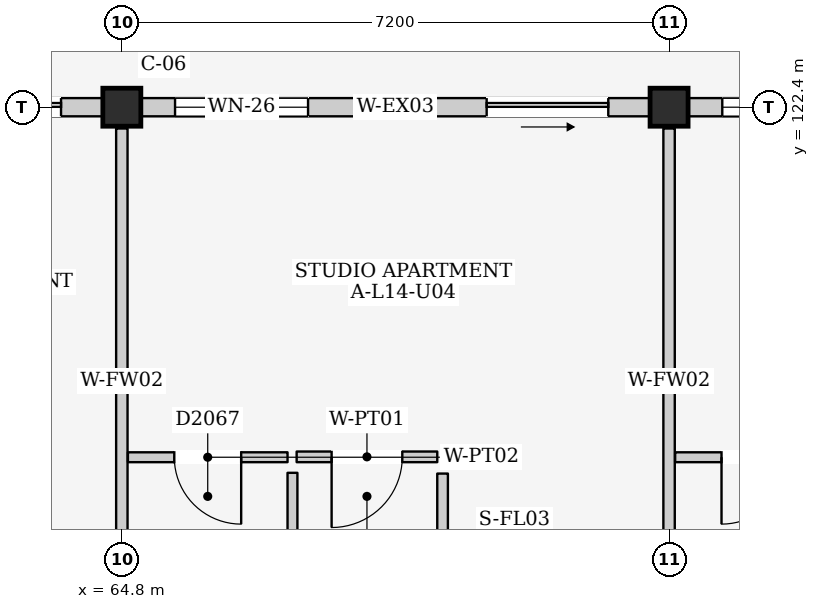
"""IFC4 building model, lengths in metres.
Left out: names, types, materials, properties, quantities, classifications, styles, units other than length and angle.
Written with IfcOpenShell. Run it as: python <this file> out.ifc"""

import sys

from ifc_helpers import new_model, si_unit, direction, frame, frame_2d, origin, origin_2d, place, context, subcontext, project, spatial, rectangle, extrude, element, fill, save


model = new_model("IFC4")
c1 = context("Model", 3, precision=1e-05, world=origin(), true_north=direction((0.0, 1.0)))
c2 = subcontext(c1, "Body", "Model", "MODEL_VIEW")
j1 = project(units=[si_unit("LENGTHUNIT", "METRE"), si_unit("PLANEANGLEUNIT", "RADIAN")], contexts=[c1])
p1 = place(None, origin())
s1 = spatial("IfcSite", under=j1, at=p1, CompositionType="ELEMENT")
p2 = place(p1, origin())
s2 = spatial("IfcBuilding", under=s1, at=p2, CompositionType="ELEMENT")
p3 = place(p2, frame((0.0, 0.0, 47.7)))
s3 = spatial("IfcBuildingStorey", under=s2, at=p3, CompositionType="ELEMENT", Elevation=47.7)
for number, where, z_axis, x_axis in (
    (1, (64.8, 122.4, 0.0), (0.0, 0.0, 1.0), (1.0, 0.0, 0.0)),
    (2, (72.0, 122.4, 0.0), (0.0, 0.0, 1.0), (1.0, 0.0, 0.0)),
):
    element("IfcColumn", number, at=place(p3, frame(where, z_axis=z_axis, x_axis=x_axis)), inside=s3, PredefinedType="COLUMN", context=c2, shape_type="SweptSolid", body=[
        extrude(rectangle(XDim=0.5, YDim=0.5, at=origin_2d()), origin(), (0.0, 0.0, 1.0), 3.2),
    ])
p4 = place(p3, frame((57.85, 122.4, 0.0), z_axis=(0.0, 0.0, 1.0), x_axis=(1.0, 0.0, 0.0)))
e3 = element("IfcWall", 3, at=p4, inside=s3, PredefinedType="ELEMENTEDWALL", context=c2, shape_type="SweptSolid", body=[
    extrude(rectangle(XDim=6.7, YDim=0.24, at=frame_2d((3.35, 0.0))), origin(), (0.0, 0.0, 1.0), 2.535),
])
p5 = place(p4, frame((4.35, 0.0, 0.0)))
e4 = element("IfcOpeningElement", 4, at=p5, cuts=e3, PredefinedType="OPENING", context=c2, shape_type="SweptSolid", body=[
    extrude(rectangle(XDim=1.8, YDim=2.12, at=frame_2d((0.9, 1.06))), frame((0.0, 0.135, 0.0), z_axis=(0.0, -1.0, 0.0), x_axis=(1.0, 0.0, 0.0)), (0.0, 0.0, 1.0), 0.27),
])
p6 = place(p4, frame((0.45, 0.0, 0.825)))
e5 = element("IfcOpeningElement", 5, at=p6, cuts=e3, PredefinedType="OPENING", context=c2, shape_type="SweptSolid", body=[
    extrude(rectangle(XDim=2.05, YDim=1.6, at=frame_2d((1.025, 0.8))), frame((0.0, 0.135, 0.0), z_axis=(0.0, -1.0, 0.0), x_axis=(1.0, 0.0, 0.0)), (0.0, 0.0, 1.0), 0.27),
])
p7 = place(p3, frame((65.05, 122.4, 0.0), z_axis=(0.0, 0.0, 1.0), x_axis=(1.0, 0.0, 0.0)))
e6 = element("IfcWall", 6, at=p7, inside=s3, PredefinedType="ELEMENTEDWALL", context=c2, shape_type="SweptSolid", body=[
    extrude(rectangle(XDim=6.7, YDim=0.24, at=frame_2d((3.35, 0.0))), origin(), (0.0, 0.0, 1.0), 2.535),
])
p8 = place(p7, frame((4.55, 0.0, 0.0)))
e7 = element("IfcOpeningElement", 7, at=p8, cuts=e6, PredefinedType="OPENING", context=c2, shape_type="SweptSolid", body=[
    extrude(rectangle(XDim=1.6, YDim=2.12, at=frame_2d((0.8, 1.06))), frame((0.0, 0.135, 0.0), z_axis=(0.0, -1.0, 0.0), x_axis=(1.0, 0.0, 0.0)), (0.0, 0.0, 1.0), 0.27),
])
p9 = place(p7, frame((0.45, 0.0, 0.875)))
e8 = element("IfcOpeningElement", 8, at=p9, cuts=e6, PredefinedType="OPENING", context=c2, shape_type="SweptSolid", body=[
    extrude(rectangle(XDim=1.75, YDim=1.55, at=frame_2d((0.875, 0.775))), frame((0.0, 0.135, 0.0), z_axis=(0.0, -1.0, 0.0), x_axis=(1.0, 0.0, 0.0)), (0.0, 0.0, 1.0), 0.27),
])
p10 = place(p3, frame((72.25, 122.4, 0.0), z_axis=(0.0, 0.0, 1.0), x_axis=(1.0, 0.0, 0.0)))
e9 = element("IfcWall", 9, at=p10, inside=s3, PredefinedType="ELEMENTEDWALL", context=c2, shape_type="SweptSolid", body=[
    extrude(rectangle(XDim=6.7, YDim=0.24, at=frame_2d((3.35, 0.0))), origin(), (0.0, 0.0, 1.0), 2.535),
])
p11 = place(p10, frame((4.65, 0.0, 0.0)))
e10 = element("IfcOpeningElement", 10, at=p11, cuts=e9, PredefinedType="OPENING", context=c2, shape_type="SweptSolid", body=[
    extrude(rectangle(XDim=1.5, YDim=2.12, at=frame_2d((0.75, 1.06))), frame((0.0, 0.135, 0.0), z_axis=(0.0, -1.0, 0.0), x_axis=(1.0, 0.0, 0.0)), (0.0, 0.0, 1.0), 0.27),
])
p12 = place(p10, frame((0.45, 0.0, 0.9)))
e11 = element("IfcOpeningElement", 11, at=p12, cuts=e9, PredefinedType="OPENING", context=c2, shape_type="SweptSolid", body=[
    extrude(rectangle(XDim=1.8, YDim=1.5, at=frame_2d((0.9, 0.75))), frame((0.0, 0.135, 0.0), z_axis=(0.0, -1.0, 0.0), x_axis=(1.0, 0.0, 0.0)), (0.0, 0.0, 1.0), 0.27),
])
for number, where, z_axis, x_axis in (
    (12, (64.8, 115.48, 0.0), (0.0, 0.0, 1.0), (0.0, 1.0, 0.0)),
    (13, (72.0, 115.48, 0.0), (0.0, 0.0, 1.0), (0.0, 1.0, 0.0)),
):
    element("IfcWall", number, at=place(p3, frame(where, z_axis=z_axis, x_axis=x_axis)), inside=s3, PredefinedType="PARTITIONING", context=c2, shape_type="SweptSolid", body=[
        extrude(rectangle(XDim=6.64, YDim=0.15, at=frame_2d((3.32, 0.0))), origin(), (0.0, 0.0, 1.0), 2.485),
    ])
p13 = place(p3, frame((64.88, 117.795, 0.0), z_axis=(0.0, 0.0, 1.0), x_axis=(1.0, 0.0, 0.0)))
e14 = element("IfcWall", 14, at=p13, inside=s3, PredefinedType="PARTITIONING", context=c2, shape_type="SweptSolid", body=[
    extrude(rectangle(XDim=2.1, YDim=0.13, at=frame_2d((1.05, 0.0))), origin(), (0.0, 0.0, 1.0), 3.0),
])
p14 = place(p13, frame((0.61, 0.0, 0.0)))
e15 = element("IfcOpeningElement", 15, at=p14, cuts=e14, PredefinedType="OPENING", context=c2, shape_type="SweptSolid", body=[
    extrude(rectangle(XDim=0.88, YDim=2.1, at=frame_2d((0.44, 1.05))), frame((0.0, 0.08, 0.0), z_axis=(0.0, -1.0, 0.0), x_axis=(1.0, 0.0, 0.0)), (0.0, 0.0, 1.0), 0.16),
])
p15 = place(p3, frame((67.045, 115.46, 0.0), z_axis=(0.0, 0.0, 1.0), x_axis=(0.0, 1.0, 0.0)))
e16 = element("IfcWall", 16, at=p15, inside=s3, PredefinedType="PARTITIONING", context=c2, shape_type="SweptSolid", body=[
    extrude(rectangle(XDim=2.13, YDim=0.13, at=frame_2d((1.065, 0.0))), origin(), (0.0, 0.0, 1.0), 3.0),
])
p16 = place(p3, frame((67.1, 117.8, 0.0), z_axis=(0.0, 0.0, 1.0), x_axis=(1.0, 0.0, 0.0)))
e17 = element("IfcWall", 17, at=p16, inside=s3, PredefinedType="PARTITIONING", context=c2, shape_type="SweptSolid", body=[
    extrude(rectangle(XDim=1.85, YDim=0.14, at=frame_2d((0.925, 0.0))), origin(), (0.0, 0.0, 1.0), 3.0),
])
p17 = place(p16, frame((0.46, 0.0, 0.0)))
e18 = element("IfcOpeningElement", 18, at=p17, cuts=e17, PredefinedType="OPENING", context=c2, shape_type="SweptSolid", body=[
    extrude(rectangle(XDim=0.93, YDim=2.14, at=frame_2d((0.465, 1.07))), frame((0.0, 0.085, 0.0), z_axis=(0.0, -1.0, 0.0), x_axis=(1.0, 0.0, 0.0)), (0.0, 0.0, 1.0), 0.17),
])
p18 = place(p3, frame((69.02, 115.43, 0.0), z_axis=(0.0, 0.0, 1.0), x_axis=(0.0, 1.0, 0.0)))
e19 = element("IfcWall", 19, at=p18, inside=s3, PredefinedType="PARTITIONING", context=c2, shape_type="SweptSolid", body=[
    extrude(rectangle(XDim=2.15, YDim=0.14, at=frame_2d((1.075, 0.0))), origin(), (0.0, 0.0, 1.0), 3.0),
])
p19 = place(p3, frame((72.08, 117.795, 0.0), z_axis=(0.0, 0.0, 1.0), x_axis=(1.0, 0.0, 0.0)))
e20 = element("IfcWall", 20, at=p19, inside=s3, PredefinedType="PARTITIONING", context=c2, shape_type="SweptSolid", body=[
    extrude(rectangle(XDim=2.1, YDim=0.13, at=frame_2d((1.05, 0.0))), origin(), (0.0, 0.0, 1.0), 3.0),
])
p20 = place(p19, frame((0.61, 0.0, 0.0)))
e21 = element("IfcOpeningElement", 21, at=p20, cuts=e20, PredefinedType="OPENING", context=c2, shape_type="SweptSolid", body=[
    extrude(rectangle(XDim=0.88, YDim=2.1, at=frame_2d((0.44, 1.05))), frame((0.0, 0.08, 0.0), z_axis=(0.0, -1.0, 0.0), x_axis=(1.0, 0.0, 0.0)), (0.0, 0.0, 1.0), 0.16),
])
p21 = place(p5, frame((1.8, 0.0, 0.0), z_axis=(0.0, 0.0, 1.0), x_axis=(-1.0, 0.0, 0.0)))
e22 = element("IfcDoor", 22, at=p21, inside=s3, OperationType="SLIDING_TO_LEFT", PredefinedType="DOOR", context=c2, shape_type="SweptSolid", body=[
    extrude(rectangle(XDim=1.8, YDim=2.12, at=frame_2d((0.9, 1.06))), frame((0.0, 0.025, 0.0), z_axis=(0.0, -1.0, 0.0), x_axis=(1.0, 0.0, 0.0)), (0.0, 0.0, 1.0), 0.05),
])
fill(e4, e22)
p22 = place(p8, frame((1.6, 0.0, 0.0), z_axis=(0.0, 0.0, 1.0), x_axis=(-1.0, 0.0, 0.0)))
e23 = element("IfcDoor", 23, at=p22, inside=s3, OperationType="SLIDING_TO_RIGHT", PredefinedType="DOOR", context=c2, shape_type="SweptSolid", body=[
    extrude(rectangle(XDim=1.6, YDim=2.12, at=frame_2d((0.8, 1.06))), frame((0.0, 0.025, 0.0), z_axis=(0.0, -1.0, 0.0), x_axis=(1.0, 0.0, 0.0)), (0.0, 0.0, 1.0), 0.05),
])
fill(e7, e23)
p23 = place(p9, origin())
e24 = element("IfcWindow", 24, at=p23, inside=s3, PartitioningType="DOUBLE_PANEL_VERTICAL", PredefinedType="WINDOW", context=c2, shape_type="SweptSolid", body=[
    extrude(rectangle(XDim=1.75, YDim=1.55, at=frame_2d((0.875, 0.775))), frame((0.0, 0.03, 0.0), z_axis=(0.0, -1.0, 0.0), x_axis=(1.0, 0.0, 0.0)), (0.0, 0.0, 1.0), 0.06),
])
fill(e8, e24)
p24 = place(p12, origin())
e25 = element("IfcWindow", 25, at=p24, inside=s3, PartitioningType="DOUBLE_PANEL_VERTICAL", PredefinedType="WINDOW", context=c2, shape_type="SweptSolid", body=[
    extrude(rectangle(XDim=1.8, YDim=1.5, at=frame_2d((0.9, 0.75))), frame((0.0, 0.03, 0.0), z_axis=(0.0, -1.0, 0.0), x_axis=(1.0, 0.0, 0.0)), (0.0, 0.0, 1.0), 0.06),
])
fill(e11, e25)
p25 = place(p14, frame((0.88, 0.0, 0.0), z_axis=(0.0, 0.0, 1.0), x_axis=(-1.0, 0.0, 0.0)))
e26 = element("IfcDoor", 26, at=p25, inside=s3, OperationType="SINGLE_SWING_LEFT", PredefinedType="DOOR", context=c2, shape_type="SweptSolid", body=[
    extrude(rectangle(XDim=0.88, YDim=2.1, at=frame_2d((0.44, 1.05))), frame((0.0, 0.025, 0.0), z_axis=(0.0, -1.0, 0.0), x_axis=(1.0, 0.0, 0.0)), (0.0, 0.0, 1.0), 0.05),
])
fill(e15, e26)
p26 = place(p17, frame((0.93, 0.0, 0.0), z_axis=(0.0, 0.0, 1.0), x_axis=(-1.0, 0.0, 0.0)))
e27 = element("IfcDoor", 27, at=p26, inside=s3, OperationType="SINGLE_SWING_RIGHT", PredefinedType="DOOR", context=c2, shape_type="SweptSolid", body=[
    extrude(rectangle(XDim=0.93, YDim=2.14, at=frame_2d((0.465, 1.07))), frame((0.0, 0.025, 0.0), z_axis=(0.0, -1.0, 0.0), x_axis=(1.0, 0.0, 0.0)), (0.0, 0.0, 1.0), 0.05),
])
fill(e18, e27)
p27 = place(p20, frame((0.88, 0.0, 0.0), z_axis=(0.0, 0.0, 1.0), x_axis=(-1.0, 0.0, 0.0)))
e28 = element("IfcDoor", 28, at=p27, inside=s3, OperationType="SINGLE_SWING_RIGHT", PredefinedType="DOOR", context=c2, shape_type="SweptSolid", body=[
    extrude(rectangle(XDim=0.88, YDim=2.1, at=frame_2d((0.44, 1.05))), frame((0.0, 0.025, 0.0), z_axis=(0.0, -1.0, 0.0), x_axis=(1.0, 0.0, 0.0)), (0.0, 0.0, 1.0), 0.05),
])
fill(e21, e28)
save(model, sys.argv[1])
